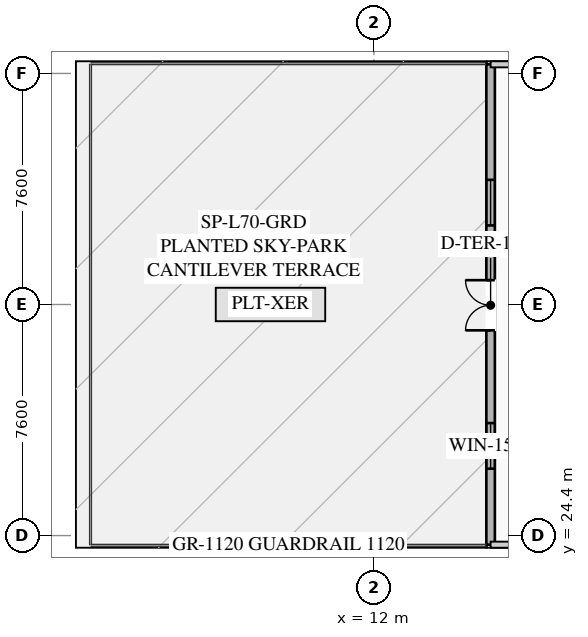
"""IFC4 building model, lengths in metres.
Left out: names, types, materials, properties, quantities, classifications, styles, units other than length and angle.
Written with IfcOpenShell. Run it as: python <this file> out.ifc"""

import sys

from ifc_helpers import new_model, si_unit, direction, frame, frame_2d, origin, place, context, subcontext, project, spatial, rectangle, extrude, element, fill, save


model = new_model("IFC4")
c1 = context("Model", 3, precision=1e-05, world=origin(), true_north=direction((0.0, 1.0)))
c2 = subcontext(c1, "Body", "Model", "MODEL_VIEW")
j1 = project(units=[si_unit("LENGTHUNIT", "METRE"), si_unit("PLANEANGLEUNIT", "RADIAN")], contexts=[c1])
p1 = place(None, origin())
s1 = spatial("IfcSite", under=j1, at=p1, CompositionType="ELEMENT")
p2 = place(p1, origin())
s2 = spatial("IfcBuilding", under=s1, at=p2, CompositionType="ELEMENT")
p3 = place(p2, frame((0.0, 0.0, 259.4)))
s3 = spatial("IfcBuildingStorey", under=s2, at=p3, CompositionType="ELEMENT", Elevation=259.4)
p4 = place(p3, frame((15.84, 24.1, 0.0), z_axis=(0.0, 0.0, 1.0), x_axis=(0.0, 1.0, 0.0)))
e1 = element("IfcWall", 1, at=p4, inside=s3, PredefinedType="SOLIDWALL", context=c2, shape_type="SweptSolid", body=[
    extrude(rectangle(XDim=15.8, YDim=0.28, at=frame_2d((7.9, 0.0))), origin(), (0.0, 0.0, 1.0), 3.7),
])
p5 = place(p4, frame((7.05, 0.0, 0.0)))
e2 = element("IfcOpeningElement", 2, at=p5, cuts=e1, PredefinedType="OPENING", context=c2, shape_type="SweptSolid", body=[
    extrude(rectangle(XDim=1.65, YDim=2.2, at=frame_2d((0.825, 1.1))), frame((0.0, 0.15, 0.0), z_axis=(0.0, -1.0, 0.0), x_axis=(1.0, 0.0, 0.0)), (0.0, 0.0, 1.0), 0.3),
])
p6 = place(p4, frame((2.5, 0.0, 0.9)))
e3 = element("IfcOpeningElement", 3, at=p6, cuts=e1, PredefinedType="OPENING", context=c2, shape_type="SweptSolid", body=[
    extrude(rectangle(XDim=1.5, YDim=1.8, at=frame_2d((0.75, 0.9))), frame((0.0, 0.15, 0.0), z_axis=(0.0, -1.0, 0.0), x_axis=(1.0, 0.0, 0.0)), (0.0, 0.0, 1.0), 0.3),
])
p7 = place(p4, frame((10.5, 0.0, 0.9)))
e4 = element("IfcOpeningElement", 4, at=p7, cuts=e1, PredefinedType="OPENING", context=c2, shape_type="SweptSolid", body=[
    extrude(rectangle(XDim=1.5, YDim=1.8, at=frame_2d((0.75, 0.9))), frame((0.0, 0.15, 0.0), z_axis=(0.0, -1.0, 0.0), x_axis=(1.0, 0.0, 0.0)), (0.0, 0.0, 1.0), 0.3),
])
p8 = place(p5, origin())
e5 = element("IfcDoor", 5, at=p8, inside=s3, OperationType="DOUBLE_DOOR_SINGLE_SWING", PredefinedType="DOOR", context=c2, shape_type="SweptSolid", body=[
    extrude(rectangle(XDim=1.65, YDim=2.2, at=frame_2d((0.825, 1.1))), frame((0.0, 0.025, 0.0), z_axis=(0.0, -1.0, 0.0), x_axis=(1.0, 0.0, 0.0)), (0.0, 0.0, 1.0), 0.05),
])
fill(e2, e5)
p9 = place(p6, origin())
e6 = element("IfcWindow", 6, at=p9, inside=s3, PartitioningType="SINGLE_PANEL", PredefinedType="WINDOW", context=c2, shape_type="SweptSolid", body=[
    extrude(rectangle(XDim=1.5, YDim=1.8, at=frame_2d((0.75, 0.9))), frame((0.0, 0.03, 0.0), z_axis=(0.0, -1.0, 0.0), x_axis=(1.0, 0.0, 0.0)), (0.0, 0.0, 1.0), 0.06),
])
fill(e3, e6)
p10 = place(p7, origin())
e7 = element("IfcWindow", 7, at=p10, inside=s3, PartitioningType="SINGLE_PANEL", PredefinedType="WINDOW", context=c2, shape_type="SweptSolid", body=[
    extrude(rectangle(XDim=1.5, YDim=1.8, at=frame_2d((0.75, 0.9))), frame((0.0, 0.03, 0.0), z_axis=(0.0, -1.0, 0.0), x_axis=(1.0, 0.0, 0.0)), (0.0, 0.0, 1.0), 0.06),
])
fill(e4, e7)
save(model, sys.argv[1])
